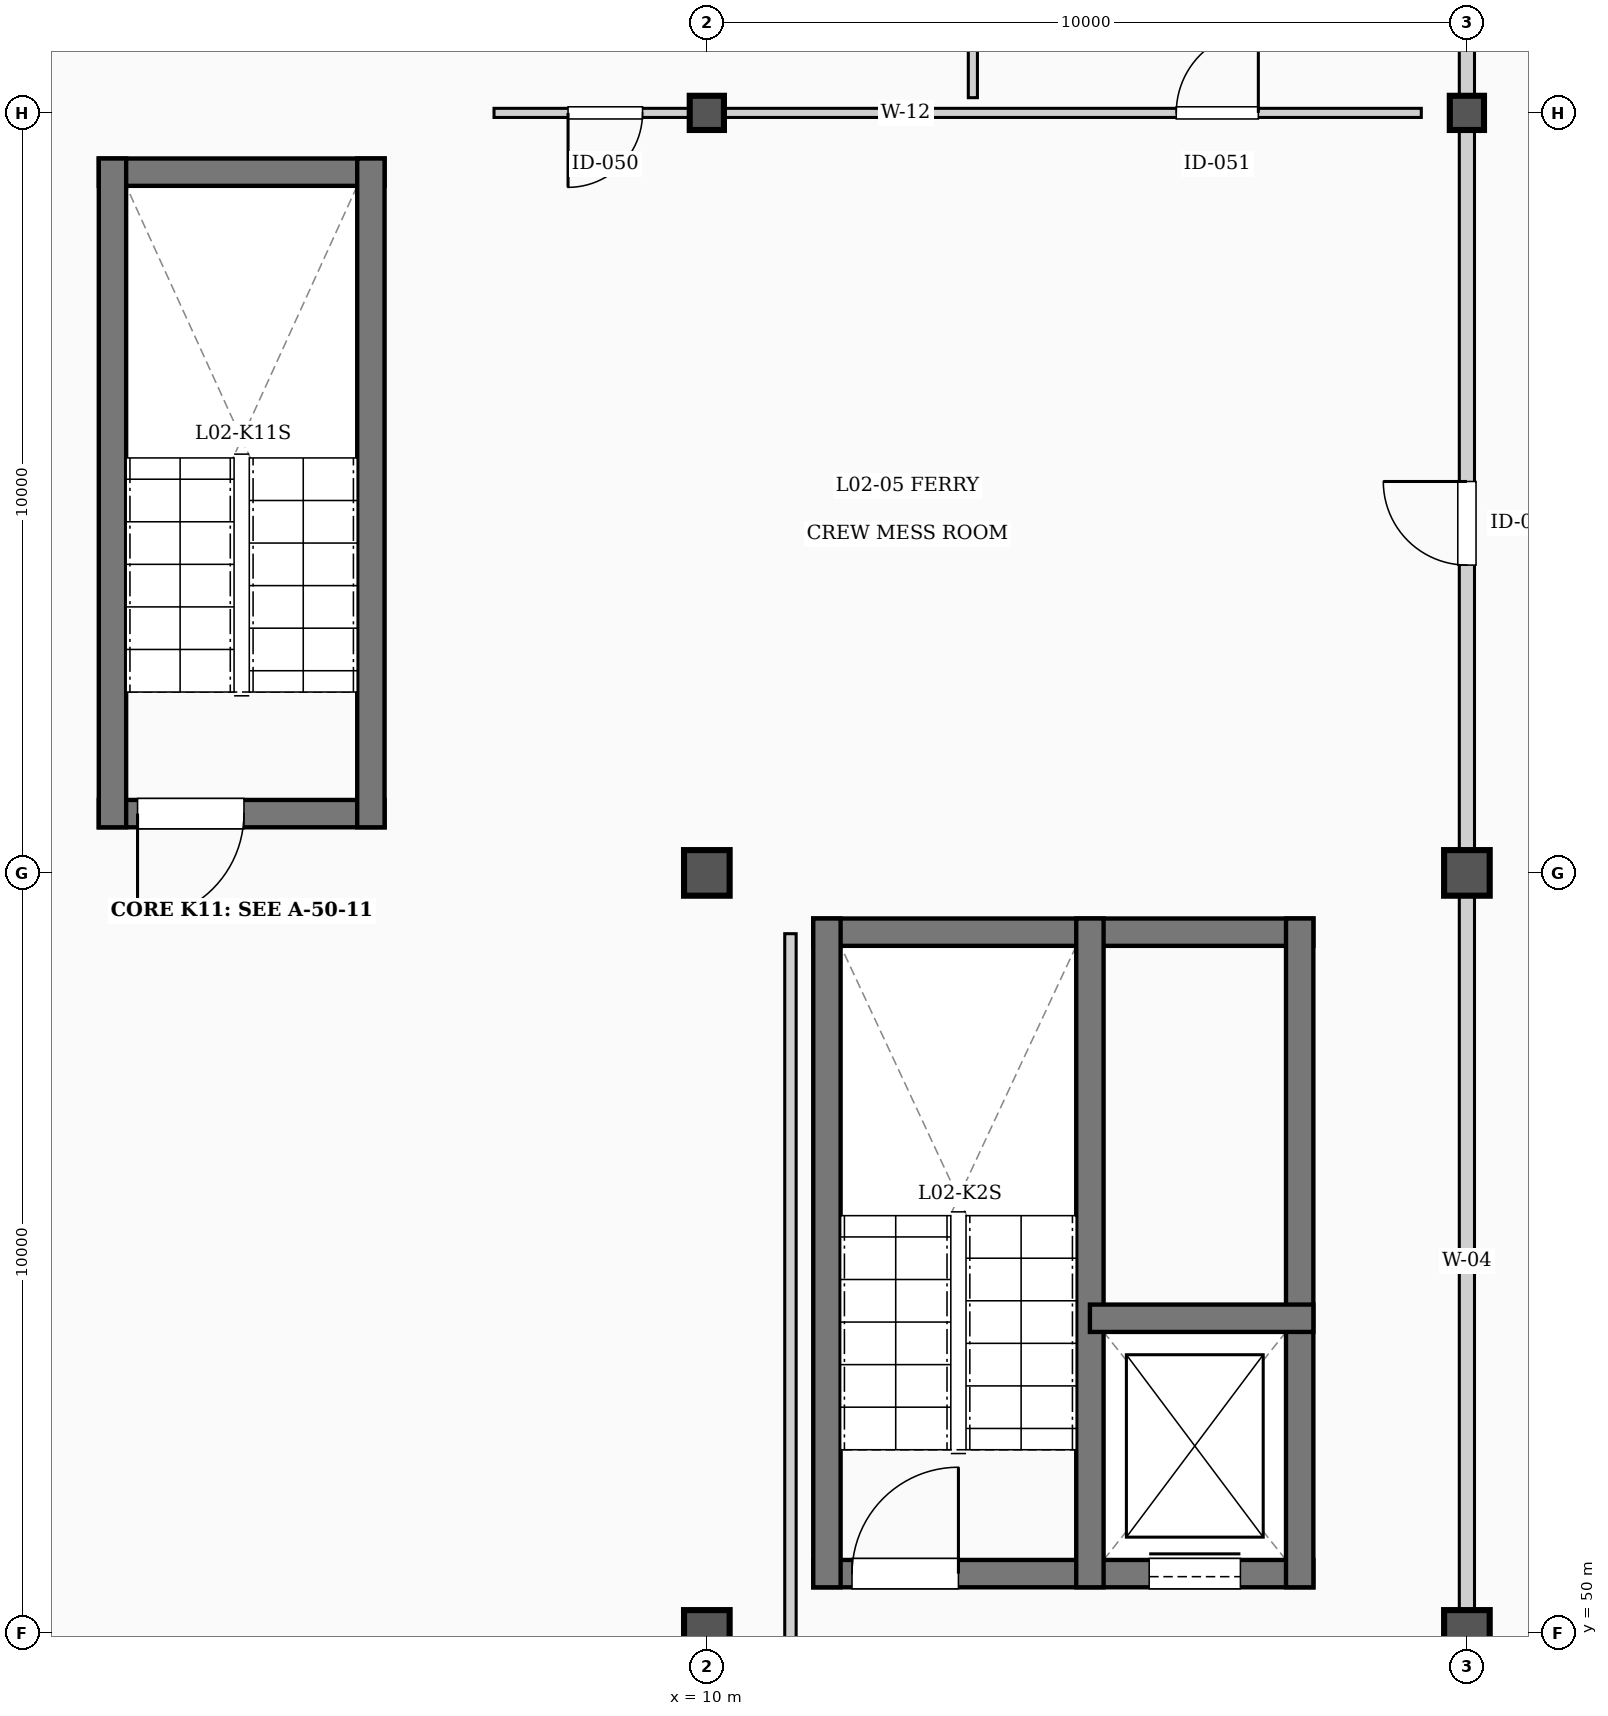
"""IFC4 building model, lengths in metres.
Left out: names, types, materials, properties, quantities, classifications, styles, units other than length and angle.
Written with IfcOpenShell. Run it as: python <this file> out.ifc"""

import sys

from ifc_helpers import new_model, si_unit, direction, frame, frame_2d, origin, origin_2d, place, context, subcontext, project, spatial, rectangle, extrude, element, fill, save


model = new_model("IFC4")
c1 = context("Model", 3, precision=1e-05, world=origin(), true_north=direction((0.0, 1.0)))
c2 = subcontext(c1, "Body", "Model", "MODEL_VIEW")
j1 = project(units=[si_unit("LENGTHUNIT", "METRE"), si_unit("PLANEANGLEUNIT", "RADIAN")], contexts=[c1])
p1 = place(None, origin())
s1 = spatial("IfcSite", under=j1, at=p1, CompositionType="ELEMENT")
p2 = place(p1, origin())
s2 = spatial("IfcBuilding", under=s1, at=p2, CompositionType="ELEMENT")
p3 = place(p2, frame((0.0, 0.0, 10.2)))
s3 = spatial("IfcBuildingStorey", under=s2, at=p3, CompositionType="ELEMENT", Elevation=10.2)
for number, where, z_axis, x_axis in (
    (1, (10.0, 50.0, 0.0), (0.0, 0.0, 1.0), (1.0, 0.0, 0.0)),
    (2, (10.0, 60.0, 0.0), (0.0, 0.0, 1.0), (1.0, 0.0, 0.0)),
):
    element("IfcColumn", number, at=place(p3, frame(where, z_axis=z_axis, x_axis=x_axis)), inside=s3, PredefinedType="COLUMN", context=c2, shape_type="SweptSolid", body=[
        extrude(rectangle(XDim=0.6, YDim=0.6, at=origin_2d()), origin(), (0.0, 0.0, 1.0), 4.2),
    ])
p4 = place(p3, frame((10.0, 70.0, 0.0), z_axis=(0.0, 0.0, 1.0), x_axis=(1.0, 0.0, 0.0)))
e3 = element("IfcColumn", 3, at=p4, inside=s3, PredefinedType="COLUMN", context=c2, shape_type="SweptSolid", body=[
    extrude(rectangle(XDim=0.45, YDim=0.45, at=origin_2d()), origin(), (0.0, 0.0, 1.0), 4.2),
])
for number, where, z_axis, x_axis in (
    (4, (20.0, 50.0, 0.0), (0.0, 0.0, 1.0), (1.0, 0.0, 0.0)),
    (5, (20.0, 60.0, 0.0), (0.0, 0.0, 1.0), (1.0, 0.0, 0.0)),
):
    element("IfcColumn", number, at=place(p3, frame(where, z_axis=z_axis, x_axis=x_axis)), inside=s3, PredefinedType="COLUMN", context=c2, shape_type="SweptSolid", body=[
        extrude(rectangle(XDim=0.6, YDim=0.6, at=origin_2d()), origin(), (0.0, 0.0, 1.0), 4.2),
    ])
p5 = place(p3, frame((20.0, 70.0, 0.0), z_axis=(0.0, 0.0, 1.0), x_axis=(1.0, 0.0, 0.0)))
e6 = element("IfcColumn", 6, at=p5, inside=s3, PredefinedType="COLUMN", context=c2, shape_type="SweptSolid", body=[
    extrude(rectangle(XDim=0.45, YDim=0.45, at=origin_2d()), origin(), (0.0, 0.0, 1.0), 4.2),
])
p6 = place(p3, frame((11.4, 50.78, 0.0), z_axis=(0.0, 0.0, 1.0), x_axis=(1.0, 0.0, 0.0)))
e7 = element("IfcWall", 7, at=p6, inside=s3, PredefinedType="SHEAR", context=c2, shape_type="SweptSolid", body=[
    extrude(rectangle(XDim=6.58, YDim=0.36, at=frame_2d((3.29, 0.0))), origin(), (0.0, 0.0, 1.0), 4.2),
])
p7 = place(p6, frame((0.51, 0.0, 0.0)))
e8 = element("IfcOpeningElement", 8, at=p7, cuts=e7, PredefinedType="OPENING", context=c2, shape_type="SweptSolid", body=[
    extrude(rectangle(XDim=1.4, YDim=2.35, at=frame_2d((0.7, 1.175))), frame((0.0, 0.19, 0.0), z_axis=(0.0, -1.0, 0.0), x_axis=(1.0, 0.0, 0.0)), (0.0, 0.0, 1.0), 0.38),
])
p8 = place(p6, frame((4.42, 0.0, 0.0)))
e9 = element("IfcOpeningElement", 9, at=p8, cuts=e7, PredefinedType="OPENING", context=c2, shape_type="SweptSolid", body=[
    extrude(rectangle(XDim=1.2, YDim=2.35, at=frame_2d((0.6, 1.175))), frame((0.0, 0.19, 0.0), z_axis=(0.0, -1.0, 0.0), x_axis=(1.0, 0.0, 0.0)), (0.0, 0.0, 1.0), 0.38),
])
p9 = place(p3, frame((11.4, 59.22, 0.0), z_axis=(0.0, 0.0, 1.0), x_axis=(1.0, 0.0, 0.0)))
e10 = element("IfcWall", 10, at=p9, inside=s3, PredefinedType="SHEAR", context=c2, shape_type="SweptSolid", body=[
    extrude(rectangle(XDim=6.58, YDim=0.36, at=frame_2d((3.29, 0.0))), origin(), (0.0, 0.0, 1.0), 4.2),
])
for number, where, z_axis, x_axis in (
    (11, (11.58, 50.6, 0.0), (0.0, 0.0, 1.0), (0.0, 1.0, 0.0)),
    (12, (17.8, 50.6, 0.0), (0.0, 0.0, 1.0), (0.0, 1.0, 0.0)),
    (13, (15.04, 50.6, 0.0), (0.0, 0.0, 1.0), (0.0, 1.0, 0.0)),
):
    element("IfcWall", number, at=place(p3, frame(where, z_axis=z_axis, x_axis=x_axis)), inside=s3, PredefinedType="SHEAR", context=c2, shape_type="SweptSolid", body=[
        extrude(rectangle(XDim=8.8, YDim=0.36, at=frame_2d((4.4, 0.0))), origin(), (0.0, 0.0, 1.0), 4.2),
    ])
p10 = place(p3, frame((15.04, 54.14, 0.0), z_axis=(0.0, 0.0, 1.0), x_axis=(1.0, 0.0, 0.0)))
e14 = element("IfcWall", 14, at=p10, inside=s3, PredefinedType="SHEAR", context=c2, shape_type="SweptSolid", body=[
    extrude(rectangle(XDim=2.94, YDim=0.36, at=frame_2d((1.47, 0.0))), origin(), (0.0, 0.0, 1.0), 4.2),
])
p11 = place(p3, frame((2.0, 60.78, 0.0), z_axis=(0.0, 0.0, 1.0), x_axis=(1.0, 0.0, 0.0)))
e15 = element("IfcWall", 15, at=p11, inside=s3, PredefinedType="SHEAR", context=c2, shape_type="SweptSolid", body=[
    extrude(rectangle(XDim=3.76, YDim=0.36, at=frame_2d((1.88, 0.0))), origin(), (0.0, 0.0, 1.0), 4.2),
])
p12 = place(p11, frame((0.51, 0.0, 0.0)))
e16 = element("IfcOpeningElement", 16, at=p12, cuts=e15, PredefinedType="OPENING", context=c2, shape_type="SweptSolid", body=[
    extrude(rectangle(XDim=1.4, YDim=2.35, at=frame_2d((0.7, 1.175))), frame((0.0, 0.19, 0.0), z_axis=(0.0, -1.0, 0.0), x_axis=(1.0, 0.0, 0.0)), (0.0, 0.0, 1.0), 0.38),
])
p13 = place(p3, frame((2.0, 69.22, 0.0), z_axis=(0.0, 0.0, 1.0), x_axis=(1.0, 0.0, 0.0)))
e17 = element("IfcWall", 17, at=p13, inside=s3, PredefinedType="SHEAR", context=c2, shape_type="SweptSolid", body=[
    extrude(rectangle(XDim=3.76, YDim=0.36, at=frame_2d((1.88, 0.0))), origin(), (0.0, 0.0, 1.0), 4.2),
])
for number, where, z_axis, x_axis in (
    (18, (2.18, 60.6, 0.0), (0.0, 0.0, 1.0), (0.0, 1.0, 0.0)),
    (19, (5.58, 60.6, 0.0), (0.0, 0.0, 1.0), (0.0, 1.0, 0.0)),
):
    element("IfcWall", number, at=place(p3, frame(where, z_axis=z_axis, x_axis=x_axis)), inside=s3, PredefinedType="SHEAR", context=c2, shape_type="SweptSolid", body=[
        extrude(rectangle(XDim=8.8, YDim=0.36, at=frame_2d((4.4, 0.0))), origin(), (0.0, 0.0, 1.0), 4.2),
    ])
p14 = place(p3, frame((20.0, 20.8, 0.0), z_axis=(0.0, 0.0, 1.0), x_axis=(0.0, 1.0, 0.0)))
e20 = element("IfcWall", 20, at=p14, inside=s3, PredefinedType="PARTITIONING", context=c2, shape_type="SweptSolid", body=[
    extrude(rectangle(XDim=58.4, YDim=0.2, at=frame_2d((29.2, 0.0))), origin(), (0.0, 0.0, 1.0), 3.63),
])
p15 = place(p14, frame((11.464, 0.0, 0.0)))
e21 = element("IfcOpeningElement", 21, at=p15, cuts=e20, PredefinedType="OPENING", context=c2, shape_type="SweptSolid", body=[
    extrude(rectangle(XDim=1.6, YDim=2.4, at=frame_2d((0.8, 1.2))), frame((0.0, 0.11, 0.0), z_axis=(0.0, -1.0, 0.0), x_axis=(1.0, 0.0, 0.0)), (0.0, 0.0, 1.0), 0.22),
])
p16 = place(p14, frame((23.778, 0.0, 0.0)))
e22 = element("IfcOpeningElement", 22, at=p16, cuts=e20, PredefinedType="OPENING", context=c2, shape_type="SweptSolid", body=[
    extrude(rectangle(XDim=1.5, YDim=2.5, at=frame_2d((0.75, 1.25))), frame((0.0, 0.11, 0.0), z_axis=(0.0, -1.0, 0.0), x_axis=(1.0, 0.0, 0.0)), (0.0, 0.0, 1.0), 0.22),
])
p17 = place(p14, frame((43.25, 0.0, 0.0)))
e23 = element("IfcOpeningElement", 23, at=p17, cuts=e20, PredefinedType="OPENING", context=c2, shape_type="SweptSolid", body=[
    extrude(rectangle(XDim=1.1, YDim=2.3, at=frame_2d((0.55, 1.15))), frame((0.0, 0.11, 0.0), z_axis=(0.0, -1.0, 0.0), x_axis=(1.0, 0.0, 0.0)), (0.0, 0.0, 1.0), 0.22),
])
p18 = place(p3, frame((11.1, 20.8, 0.0), z_axis=(0.0, 0.0, 1.0), x_axis=(0.0, 1.0, 0.0)))
e24 = element("IfcWall", 24, at=p18, inside=s3, PredefinedType="PARTITIONING", context=c2, shape_type="SweptSolid", body=[
    extrude(rectangle(XDim=38.4, YDim=0.15, at=frame_2d((19.2, 0.0))), origin(), (0.0, 0.0, 1.0), 3.86),
])
p19 = place(p18, frame((15.128, 0.0, 0.0)))
e25 = element("IfcOpeningElement", 25, at=p19, cuts=e24, PredefinedType="OPENING", context=c2, shape_type="SweptSolid", body=[
    extrude(rectangle(XDim=2.0, YDim=2.45, at=frame_2d((1.0, 1.225))), frame((0.0, 0.085, 0.0), z_axis=(0.0, -1.0, 0.0), x_axis=(1.0, 0.0, 0.0)), (0.0, 0.0, 1.0), 0.17),
])
p20 = place(p3, frame((7.2, 70.0, 0.0), z_axis=(0.0, 0.0, 1.0), x_axis=(1.0, 0.0, 0.0)))
e26 = element("IfcWall", 26, at=p20, inside=s3, PredefinedType="PARTITIONING", context=c2, shape_type="SweptSolid", body=[
    extrude(rectangle(XDim=12.2, YDim=0.12, at=frame_2d((6.1, 0.0))), origin(), (0.0, 0.0, 1.0), 3.47),
])
p21 = place(p20, frame((0.974, 0.0, 0.0)))
e27 = element("IfcOpeningElement", 27, at=p21, cuts=e26, PredefinedType="OPENING", context=c2, shape_type="SweptSolid", body=[
    extrude(rectangle(XDim=0.98, YDim=2.3, at=frame_2d((0.49, 1.15))), frame((0.0, 0.07, 0.0), z_axis=(0.0, -1.0, 0.0), x_axis=(1.0, 0.0, 0.0)), (0.0, 0.0, 1.0), 0.14),
])
p22 = place(p20, frame((8.976, 0.0, 0.0)))
e28 = element("IfcOpeningElement", 28, at=p22, cuts=e26, PredefinedType="OPENING", context=c2, shape_type="SweptSolid", body=[
    extrude(rectangle(XDim=1.08, YDim=2.35, at=frame_2d((0.54, 1.175))), frame((0.0, 0.07, 0.0), z_axis=(0.0, -1.0, 0.0), x_axis=(1.0, 0.0, 0.0)), (0.0, 0.0, 1.0), 0.14),
])
p23 = place(p3, frame((13.5, 70.2, 0.0), z_axis=(0.0, 0.0, 1.0), x_axis=(0.0, 1.0, 0.0)))
e29 = element("IfcWall", 29, at=p23, inside=s3, PredefinedType="PARTITIONING", context=c2, shape_type="SweptSolid", body=[
    extrude(rectangle(XDim=9.2, YDim=0.12, at=frame_2d((4.6, 0.0))), origin(), (0.0, 0.0, 1.0), 3.86),
])
p24 = place(p7, origin())
e30 = element("IfcDoor", 30, at=p24, inside=s3, OperationType="SINGLE_SWING_RIGHT", PredefinedType="DOOR", context=c2, shape_type="SweptSolid", body=[
    extrude(rectangle(XDim=1.4, YDim=2.35, at=frame_2d((0.7, 1.175))), frame((0.0, 0.025, 0.0), z_axis=(0.0, -1.0, 0.0), x_axis=(1.0, 0.0, 0.0)), (0.0, 0.0, 1.0), 0.05),
])
fill(e8, e30)
p25 = place(p8, origin())
e31 = element("IfcDoor", 31, at=p25, inside=s3, OperationType="SLIDING_TO_LEFT", PredefinedType="DOOR", context=c2, shape_type="SweptSolid", body=[
    extrude(rectangle(XDim=1.2, YDim=2.35, at=frame_2d((0.6, 1.175))), frame((0.0, 0.025, 0.0), z_axis=(0.0, -1.0, 0.0), x_axis=(1.0, 0.0, 0.0)), (0.0, 0.0, 1.0), 0.05),
])
fill(e9, e31)
p26 = place(p12, origin())
e32 = element("IfcDoor", 32, at=p26, inside=s3, OperationType="SINGLE_SWING_LEFT", PredefinedType="DOOR", context=c2, shape_type="SweptSolid", body=[
    extrude(rectangle(XDim=1.4, YDim=2.35, at=frame_2d((0.7, 1.175))), frame((0.0, 0.025, 0.0), z_axis=(0.0, -1.0, 0.0), x_axis=(1.0, 0.0, 0.0)), (0.0, 0.0, 1.0), 0.05),
])
fill(e16, e32)
p27 = place(p17, origin())
e33 = element("IfcDoor", 33, at=p27, inside=s3, OperationType="SINGLE_SWING_RIGHT", PredefinedType="DOOR", context=c2, shape_type="SweptSolid", body=[
    extrude(rectangle(XDim=1.1, YDim=2.3, at=frame_2d((0.55, 1.15))), frame((0.0, 0.025, 0.0), z_axis=(0.0, -1.0, 0.0), x_axis=(1.0, 0.0, 0.0)), (0.0, 0.0, 1.0), 0.05),
])
fill(e23, e33)
p28 = place(p21, origin())
e34 = element("IfcDoor", 34, at=p28, inside=s3, OperationType="SINGLE_SWING_LEFT", PredefinedType="DOOR", context=c2, shape_type="SweptSolid", body=[
    extrude(rectangle(XDim=0.98, YDim=2.3, at=frame_2d((0.49, 1.15))), frame((0.0, 0.025, 0.0), z_axis=(0.0, -1.0, 0.0), x_axis=(1.0, 0.0, 0.0)), (0.0, 0.0, 1.0), 0.05),
])
fill(e27, e34)
p29 = place(p22, origin())
e35 = element("IfcDoor", 35, at=p29, inside=s3, OperationType="SINGLE_SWING_RIGHT", PredefinedType="DOOR", context=c2, shape_type="SweptSolid", body=[
    extrude(rectangle(XDim=1.08, YDim=2.35, at=frame_2d((0.54, 1.175))), frame((0.0, 0.025, 0.0), z_axis=(0.0, -1.0, 0.0), x_axis=(1.0, 0.0, 0.0)), (0.0, 0.0, 1.0), 0.05),
])
fill(e28, e35)
save(model, sys.argv[1])
